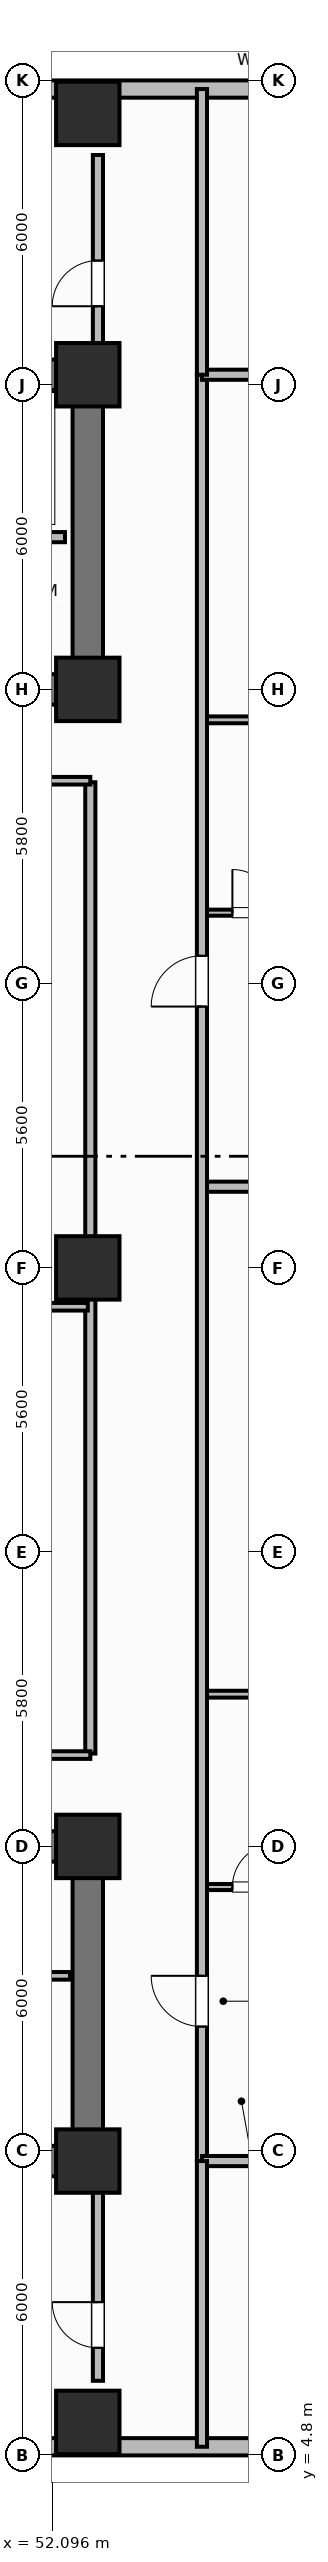
"""IFC4 building model, lengths in metres.
Left out: names, types, materials, properties, quantities, classifications, styles, units other than length and angle.
Written with IfcOpenShell. Run it as: python <this file> out.ifc"""

import sys

from ifc_helpers import new_model, si_unit, direction, frame, frame_2d, origin, origin_2d, place, context, subcontext, project, spatial, rectangle, extrude, element, fill, save


model = new_model("IFC4")
c1 = context("Model", 3, precision=1e-05, world=origin(), true_north=direction((0.0, 1.0)))
c2 = subcontext(c1, "Body", "Model", "MODEL_VIEW")
j1 = project(units=[si_unit("LENGTHUNIT", "METRE"), si_unit("PLANEANGLEUNIT", "RADIAN")], contexts=[c1])
p1 = place(None, origin())
s1 = spatial("IfcSite", under=j1, at=p1, CompositionType="ELEMENT")
p2 = place(p1, origin())
s2 = spatial("IfcBuilding", under=s1, at=p2, CompositionType="ELEMENT")
p3 = place(p2, frame((0.0, 0.0, 54.7)))
s3 = spatial("IfcBuildingStorey", under=s2, at=p3, CompositionType="ELEMENT", Elevation=54.7)
p4 = place(p3, frame((52.8, 10.6, 0.0), z_axis=(0.0, 0.0, 1.0), x_axis=(-1.0, 0.0, 0.0)))
e1 = element("IfcWall", 1, at=p4, inside=s3, PredefinedType="SHEAR", context=c2, shape_type="SweptSolid", body=[
    extrude(rectangle(XDim=27.2, YDim=0.6, at=frame_2d((13.6, 0.0))), origin(), (0.0, 0.0, 1.0), 3.7),
])
p5 = place(p3, frame((52.8, 10.9, 0.0), z_axis=(0.0, 0.0, 1.0), x_axis=(0.0, 1.0, 0.0)))
e2 = element("IfcWall", 2, at=p5, inside=s3, PredefinedType="SHEAR", context=c2, shape_type="SweptSolid", body=[
    extrude(rectangle(XDim=5.6, YDim=0.6, at=frame_2d((2.8, 0.0))), origin(), (0.0, 0.0, 1.0), 3.7),
])
p6 = place(p3, frame((25.6, 16.8, 0.0), z_axis=(0.0, 0.0, 1.0), x_axis=(1.0, 0.0, 0.0)))
e3 = element("IfcWall", 3, at=p6, inside=s3, PredefinedType="SHEAR", context=c2, shape_type="SweptSolid", body=[
    extrude(rectangle(XDim=27.2, YDim=0.6, at=frame_2d((13.6, 0.0))), origin(), (0.0, 0.0, 1.0), 3.7),
])
p7 = place(p6, frame((1.8, 0.0, 0.0)))
e4 = element("IfcOpeningElement", 4, at=p7, cuts=e3, PredefinedType="OPENING", context=c2, shape_type="SweptSolid", body=[
    extrude(rectangle(XDim=1.1, YDim=2.15, at=frame_2d((0.55, 1.075))), frame((0.0, 0.31, 0.0), z_axis=(0.0, -1.0, 0.0), x_axis=(1.0, 0.0, 0.0)), (0.0, 0.0, 1.0), 0.62),
])
p8 = place(p6, frame((5.6, 0.0, 0.0)))
e5 = element("IfcOpeningElement", 5, at=p8, cuts=e3, PredefinedType="OPENING", context=c2, shape_type="SweptSolid", body=[
    extrude(rectangle(XDim=0.85, YDim=2.1, at=frame_2d((0.425, 1.05))), frame((0.0, 0.31, 0.0), z_axis=(0.0, -1.0, 0.0), x_axis=(1.0, 0.0, 0.0)), (0.0, 0.0, 1.0), 0.62),
])
p9 = place(p6, frame((13.0, 0.0, 0.0)))
e6 = element("IfcOpeningElement", 6, at=p9, cuts=e3, PredefinedType="OPENING", context=c2, shape_type="SweptSolid", body=[
    extrude(rectangle(XDim=1.2, YDim=2.15, at=frame_2d((0.6, 1.075))), frame((0.0, 0.31, 0.0), z_axis=(0.0, -1.0, 0.0), x_axis=(1.0, 0.0, 0.0)), (0.0, 0.0, 1.0), 0.62),
])
p10 = place(p6, frame((20.4, 0.0, 0.0)))
e7 = element("IfcOpeningElement", 7, at=p10, cuts=e3, PredefinedType="OPENING", context=c2, shape_type="SweptSolid", body=[
    extrude(rectangle(XDim=1.3, YDim=2.2, at=frame_2d((0.65, 1.1))), frame((0.0, 0.31, 0.0), z_axis=(0.0, -1.0, 0.0), x_axis=(1.0, 0.0, 0.0)), (0.0, 0.0, 1.0), 0.62),
])
p11 = place(p6, frame((24.65, 0.0, 0.0)))
e8 = element("IfcOpeningElement", 8, at=p11, cuts=e3, PredefinedType="OPENING", context=c2, shape_type="SweptSolid", body=[
    extrude(rectangle(XDim=0.85, YDim=2.1, at=frame_2d((0.425, 1.05))), frame((0.0, 0.31, 0.0), z_axis=(0.0, -1.0, 0.0), x_axis=(1.0, 0.0, 0.0)), (0.0, 0.0, 1.0), 0.62),
])
p12 = place(p3, frame((25.6, 45.8, 0.0), z_axis=(0.0, 0.0, 1.0), x_axis=(1.0, 0.0, 0.0)))
e9 = element("IfcWall", 9, at=p12, inside=s3, PredefinedType="SHEAR", context=c2, shape_type="SweptSolid", body=[
    extrude(rectangle(XDim=27.2, YDim=0.6, at=frame_2d((13.6, 0.0))), origin(), (0.0, 0.0, 1.0), 3.7),
])
p13 = place(p3, frame((52.8, 39.9, 0.0), z_axis=(0.0, 0.0, 1.0), x_axis=(0.0, 1.0, 0.0)))
e10 = element("IfcWall", 10, at=p13, inside=s3, PredefinedType="SHEAR", context=c2, shape_type="SweptSolid", body=[
    extrude(rectangle(XDim=5.6, YDim=0.6, at=frame_2d((2.8, 0.0))), origin(), (0.0, 0.0, 1.0), 3.7),
])
p14 = place(p3, frame((52.8, 39.6, 0.0), z_axis=(0.0, 0.0, 1.0), x_axis=(-1.0, 0.0, 0.0)))
e11 = element("IfcWall", 11, at=p14, inside=s3, PredefinedType="SHEAR", context=c2, shape_type="SweptSolid", body=[
    extrude(rectangle(XDim=27.2, YDim=0.6, at=frame_2d((13.6, 0.0))), origin(), (0.0, 0.0, 1.0), 3.7),
])
p15 = place(p14, frame((24.2, 0.0, 0.0)))
e12 = element("IfcOpeningElement", 12, at=p15, cuts=e11, PredefinedType="OPENING", context=c2, shape_type="SweptSolid", body=[
    extrude(rectangle(XDim=1.1, YDim=2.15, at=frame_2d((0.55, 1.075))), frame((0.0, 0.31, 0.0), z_axis=(0.0, -1.0, 0.0), x_axis=(1.0, 0.0, 0.0)), (0.0, 0.0, 1.0), 0.62),
])
p16 = place(p14, frame((20.55, 0.0, 0.0)))
e13 = element("IfcOpeningElement", 13, at=p16, cuts=e11, PredefinedType="OPENING", context=c2, shape_type="SweptSolid", body=[
    extrude(rectangle(XDim=0.95, YDim=2.1, at=frame_2d((0.475, 1.05))), frame((0.0, 0.31, 0.0), z_axis=(0.0, -1.0, 0.0), x_axis=(1.0, 0.0, 0.0)), (0.0, 0.0, 1.0), 0.62),
])
p17 = place(p14, frame((15.1, 0.0, 0.0)))
e14 = element("IfcOpeningElement", 14, at=p17, cuts=e11, PredefinedType="OPENING", context=c2, shape_type="SweptSolid", body=[
    extrude(rectangle(XDim=1.2, YDim=2.15, at=frame_2d((0.6, 1.075))), frame((0.0, 0.31, 0.0), z_axis=(0.0, -1.0, 0.0), x_axis=(1.0, 0.0, 0.0)), (0.0, 0.0, 1.0), 0.62),
])
p18 = place(p14, frame((11.6, 0.0, 0.0)))
e15 = element("IfcOpeningElement", 15, at=p18, cuts=e11, PredefinedType="OPENING", context=c2, shape_type="SweptSolid", body=[
    extrude(rectangle(XDim=0.9, YDim=2.1, at=frame_2d((0.45, 1.05))), frame((0.0, 0.31, 0.0), z_axis=(0.0, -1.0, 0.0), x_axis=(1.0, 0.0, 0.0)), (0.0, 0.0, 1.0), 0.62),
])
p19 = place(p14, frame((4.8, 0.0, 0.0)))
e16 = element("IfcOpeningElement", 16, at=p19, cuts=e11, PredefinedType="OPENING", context=c2, shape_type="SweptSolid", body=[
    extrude(rectangle(XDim=0.85, YDim=2.1, at=frame_2d((0.425, 1.05))), frame((0.0, 0.31, 0.0), z_axis=(0.0, -1.0, 0.0), x_axis=(1.0, 0.0, 0.0)), (0.0, 0.0, 1.0), 0.62),
])
p20 = place(p14, frame((1.9, 0.0, 0.0)))
e17 = element("IfcOpeningElement", 17, at=p20, cuts=e11, PredefinedType="OPENING", context=c2, shape_type="SweptSolid", body=[
    extrude(rectangle(XDim=0.85, YDim=2.1, at=frame_2d((0.425, 1.05))), frame((0.0, 0.31, 0.0), z_axis=(0.0, -1.0, 0.0), x_axis=(1.0, 0.0, 0.0)), (0.0, 0.0, 1.0), 0.62),
])
for number, where, z_axis, x_axis in (
    (18, (52.8, 10.6, 0.0), (0.0, 0.0, 1.0), (1.0, 0.0, 0.0)),
    (19, (52.8, 16.8, 0.0), (0.0, 0.0, 1.0), (1.0, 0.0, 0.0)),
    (20, (52.8, 39.6, 0.0), (0.0, 0.0, 1.0), (1.0, 0.0, 0.0)),
    (21, (52.8, 45.8, 0.0), (0.0, 0.0, 1.0), (1.0, 0.0, 0.0)),
    (22, (52.8, 28.2, 0.0), (0.0, 0.0, 1.0), (1.0, 0.0, 0.0)),
    (23, (52.8, 5.45, 0.0), (0.0, 0.0, 1.0), (1.0, 0.0, 0.0)),
    (24, (52.8, 50.95, 0.0), (0.0, 0.0, 1.0), (1.0, 0.0, 0.0)),
):
    element("IfcColumn", number, at=place(p3, frame(where, z_axis=z_axis, x_axis=x_axis)), inside=s3, PredefinedType="COLUMN", context=c2, shape_type="SweptSolid", body=[
        extrude(rectangle(XDim=1.25, YDim=1.25, at=origin_2d()), origin(), (0.0, 0.0, 1.0), 3.7),
    ])
p21 = place(p3, frame((42.4, 4.97, 0.0), z_axis=(0.0, 0.0, 1.0), x_axis=(1.0, 0.0, 0.0)))
e25 = element("IfcWall", 25, at=p21, inside=s3, PredefinedType="SOLIDWALL", context=c2, shape_type="SweptSolid", body=[
    extrude(rectangle(XDim=17.4, YDim=0.34, at=frame_2d((8.7, 0.0))), origin(), (0.0, 0.0, 1.0), 2.7),
])
p22 = place(p21, frame((4.93, 0.0, 0.93)))
e26 = element("IfcOpeningElement", 26, at=p22, cuts=e25, PredefinedType="OPENING", context=c2, shape_type="SweptSolid", body=[
    extrude(rectangle(XDim=1.1, YDim=1.65, at=frame_2d((0.55, 0.825))), frame((0.0, 0.18, 0.0), z_axis=(0.0, -1.0, 0.0), x_axis=(1.0, 0.0, 0.0)), (0.0, 0.0, 1.0), 0.36),
])
p23 = place(p21, frame((7.8, 0.0, 0.93)))
e27 = element("IfcOpeningElement", 27, at=p23, cuts=e25, PredefinedType="OPENING", context=c2, shape_type="SweptSolid", body=[
    extrude(rectangle(XDim=1.1, YDim=1.65, at=frame_2d((0.55, 0.825))), frame((0.0, 0.18, 0.0), z_axis=(0.0, -1.0, 0.0), x_axis=(1.0, 0.0, 0.0)), (0.0, 0.0, 1.0), 0.36),
])
p24 = place(p21, frame((14.59, 0.0, 0.93)))
e28 = element("IfcOpeningElement", 28, at=p24, cuts=e25, PredefinedType="OPENING", context=c2, shape_type="SweptSolid", body=[
    extrude(rectangle(XDim=1.1, YDim=1.65, at=frame_2d((0.55, 0.825))), frame((0.0, 0.18, 0.0), z_axis=(0.0, -1.0, 0.0), x_axis=(1.0, 0.0, 0.0)), (0.0, 0.0, 1.0), 0.36),
])
p25 = place(p3, frame((59.8, 51.43, 0.0), z_axis=(0.0, 0.0, 1.0), x_axis=(-1.0, 0.0, 0.0)))
e29 = element("IfcWall", 29, at=p25, inside=s3, PredefinedType="SOLIDWALL", context=c2, shape_type="SweptSolid", body=[
    extrude(rectangle(XDim=17.4, YDim=0.34, at=frame_2d((8.7, 0.0))), origin(), (0.0, 0.0, 1.0), 2.7),
])
p26 = place(p25, frame((1.863, 0.0, 0.68)))
e30 = element("IfcOpeningElement", 30, at=p26, cuts=e29, PredefinedType="OPENING", context=c2, shape_type="SweptSolid", body=[
    extrude(rectangle(XDim=1.6, YDim=1.9, at=frame_2d((0.8, 0.95))), frame((0.0, 0.18, 0.0), z_axis=(0.0, -1.0, 0.0), x_axis=(1.0, 0.0, 0.0)), (0.0, 0.0, 1.0), 0.36),
])
p27 = place(p25, frame((9.913, 0.0, 0.68)))
e31 = element("IfcOpeningElement", 31, at=p27, cuts=e29, PredefinedType="OPENING", context=c2, shape_type="SweptSolid", body=[
    extrude(rectangle(XDim=1.6, YDim=1.9, at=frame_2d((0.8, 0.95))), frame((0.0, 0.18, 0.0), z_axis=(0.0, -1.0, 0.0), x_axis=(1.0, 0.0, 0.0)), (0.0, 0.0, 1.0), 0.36),
])
p28 = place(p3, frame((49.6, 14.25, 0.0), z_axis=(0.0, 0.0, 1.0), x_axis=(1.0, 0.0, 0.0)))
e32 = element("IfcWall", 32, at=p28, inside=s3, PredefinedType="PARTITIONING", context=c2, shape_type="SweptSolid", body=[
    extrude(rectangle(XDim=2.85, YDim=0.15, at=frame_2d((1.425, 0.0))), origin(), (0.0, 0.0, 1.0), 2.53),
])
p29 = place(p28, frame((0.9, 0.0, 0.0)))
e33 = element("IfcOpeningElement", 33, at=p29, cuts=e32, PredefinedType="OPENING", context=c2, shape_type="SweptSolid", body=[
    extrude(rectangle(XDim=0.85, YDim=2.1, at=frame_2d((0.425, 1.05))), frame((0.0, 0.085, 0.0), z_axis=(0.0, -1.0, 0.0), x_axis=(1.0, 0.0, 0.0)), (0.0, 0.0, 1.0), 0.17),
])
p30 = place(p3, frame((52.35, 42.6, 0.0), z_axis=(0.0, 0.0, 1.0), x_axis=(-1.0, 0.0, 0.0)))
e34 = element("IfcWall", 34, at=p30, inside=s3, PredefinedType="PARTITIONING", context=c2, shape_type="SweptSolid", body=[
    extrude(rectangle(XDim=8.8, YDim=0.2, at=frame_2d((4.4, 0.0))), origin(), (0.0, 0.0, 1.0), 2.53),
])
p31 = place(p3, frame((52.85, 18.63, 0.0), z_axis=(0.0, 0.0, 1.0), x_axis=(0.0, 1.0, 0.0)))
e35 = element("IfcWall", 35, at=p31, inside=s3, PredefinedType="PARTITIONING", context=c2, shape_type="SweptSolid", body=[
    extrude(rectangle(XDim=19.14, YDim=0.2, at=frame_2d((9.57, 0.0))), origin(), (0.0, 0.0, 1.0), 2.53),
])
for number, where, z_axis, x_axis in (
    (36, (40.35, 18.6, 0.0), (0.0, 0.0, 1.0), (1.0, 0.0, 0.0)),
    (37, (40.35, 37.8, 0.0), (0.0, 0.0, 1.0), (1.0, 0.0, 0.0)),
):
    element("IfcWall", number, at=place(p3, frame(where, z_axis=z_axis, x_axis=x_axis)), inside=s3, PredefinedType="PARTITIONING", context=c2, shape_type="SweptSolid", body=[
        extrude(rectangle(XDim=12.5, YDim=0.15, at=frame_2d((6.25, 0.0))), origin(), (0.0, 0.0, 1.0), 2.53),
    ])
p32 = place(p3, frame((40.38, 27.434, 0.0), z_axis=(0.0, 0.0, 1.0), x_axis=(1.0, 0.0, 0.0)))
e38 = element("IfcWall", 38, at=p32, inside=s3, PredefinedType="PARTITIONING", context=c2, shape_type="SweptSolid", body=[
    extrude(rectangle(XDim=12.42, YDim=0.15, at=frame_2d((6.21, 0.0))), origin(), (0.0, 0.0, 1.0), 2.53),
])
p33 = place(p3, frame((55.05, 16.0, 0.0), z_axis=(0.0, 0.0, 1.0), x_axis=(1.0, 0.0, 0.0)))
e39 = element("IfcWall", 39, at=p33, inside=s3, PredefinedType="PARTITIONING", context=c2, shape_type="SweptSolid", body=[
    extrude(rectangle(XDim=2.25, YDim=0.12, at=frame_2d((1.125, 0.0))), origin(), (0.0, 0.0, 1.0), 2.53),
])
p34 = place(p33, frame((0.6, 0.0, 0.0)))
e40 = element("IfcOpeningElement", 40, at=p34, cuts=e39, PredefinedType="OPENING", context=c2, shape_type="SweptSolid", body=[
    extrude(rectangle(XDim=0.85, YDim=2.1, at=frame_2d((0.425, 1.05))), frame((0.0, 0.07, 0.0), z_axis=(0.0, -1.0, 0.0), x_axis=(1.0, 0.0, 0.0)), (0.0, 0.0, 1.0), 0.14),
])
p35 = place(p3, frame((55.05, 19.8, 0.0), z_axis=(0.0, 0.0, 1.0), x_axis=(1.0, 0.0, 0.0)))
e41 = element("IfcWall", 41, at=p35, inside=s3, PredefinedType="PARTITIONING", context=c2, shape_type="SweptSolid", body=[
    extrude(rectangle(XDim=2.25, YDim=0.135, at=frame_2d((1.125, 0.0))), origin(), (0.0, 0.0, 1.0), 2.53),
])
p36 = place(p3, frame((55.05, 29.8, 0.0), z_axis=(0.0, 0.0, 1.0), x_axis=(1.0, 0.0, 0.0)))
e42 = element("IfcWall", 42, at=p36, inside=s3, PredefinedType="PARTITIONING", context=c2, shape_type="SweptSolid", body=[
    extrude(rectangle(XDim=8.066, YDim=0.2, at=frame_2d((4.033, 0.0))), origin(), (0.0, 0.0, 1.0), 2.53),
])
p37 = place(p3, frame((55.05, 35.2, 0.0), z_axis=(0.0, 0.0, 1.0), x_axis=(1.0, 0.0, 0.0)))
e43 = element("IfcWall", 43, at=p37, inside=s3, PredefinedType="PARTITIONING", context=c2, shape_type="SweptSolid", body=[
    extrude(rectangle(XDim=2.25, YDim=0.12, at=frame_2d((1.125, 0.0))), origin(), (0.0, 0.0, 1.0), 2.53),
])
p38 = place(p37, frame((0.6, 0.0, 0.0)))
e44 = element("IfcOpeningElement", 44, at=p38, cuts=e43, PredefinedType="OPENING", context=c2, shape_type="SweptSolid", body=[
    extrude(rectangle(XDim=0.85, YDim=2.1, at=frame_2d((0.425, 1.05))), frame((0.0, 0.07, 0.0), z_axis=(0.0, -1.0, 0.0), x_axis=(1.0, 0.0, 0.0)), (0.0, 0.0, 1.0), 0.14),
])
p39 = place(p3, frame((55.05, 39.0, 0.0), z_axis=(0.0, 0.0, 1.0), x_axis=(1.0, 0.0, 0.0)))
e45 = element("IfcWall", 45, at=p39, inside=s3, PredefinedType="PARTITIONING", context=c2, shape_type="SweptSolid", body=[
    extrude(rectangle(XDim=2.25, YDim=0.135, at=frame_2d((1.125, 0.0))), origin(), (0.0, 0.0, 1.0), 2.53),
])
p40 = place(p3, frame((55.05, 10.6, 0.0), z_axis=(0.0, 0.0, 1.0), x_axis=(0.0, 1.0, 0.0)))
e46 = element("IfcWall", 46, at=p40, inside=s3, PredefinedType="PARTITIONING", context=c2, shape_type="SweptSolid", body=[
    extrude(rectangle(XDim=35.2, YDim=0.2, at=frame_2d((17.6, 0.0))), origin(), (0.0, 0.0, 1.0), 2.53),
])
p41 = place(p40, frame((2.65, 0.0, 0.0)))
e47 = element("IfcOpeningElement", 47, at=p41, cuts=e46, PredefinedType="OPENING", context=c2, shape_type="SweptSolid", body=[
    extrude(rectangle(XDim=1.0, YDim=2.15, at=frame_2d((0.5, 1.075))), frame((0.0, 0.11, 0.0), z_axis=(0.0, -1.0, 0.0), x_axis=(1.0, 0.0, 0.0)), (0.0, 0.0, 1.0), 0.22),
])
p42 = place(p40, frame((22.75, 0.0, 0.0)))
e48 = element("IfcOpeningElement", 48, at=p42, cuts=e46, PredefinedType="OPENING", context=c2, shape_type="SweptSolid", body=[
    extrude(rectangle(XDim=1.0, YDim=2.15, at=frame_2d((0.5, 1.075))), frame((0.0, 0.11, 0.0), z_axis=(0.0, -1.0, 0.0), x_axis=(1.0, 0.0, 0.0)), (0.0, 0.0, 1.0), 0.22),
])
for number, where, z_axis, x_axis in (
    (49, (55.05, 10.6, 0.0), (0.0, 0.0, 1.0), (1.0, 0.0, 0.0)),
    (50, (55.05, 45.8, 0.0), (0.0, 0.0, 1.0), (1.0, 0.0, 0.0)),
):
    element("IfcWall", number, at=place(p3, frame(where, z_axis=z_axis, x_axis=x_axis)), inside=s3, PredefinedType="PARTITIONING", context=c2, shape_type="SweptSolid", body=[
        extrude(rectangle(XDim=8.36, YDim=0.2, at=frame_2d((4.18, 0.0))), origin(), (0.0, 0.0, 1.0), 2.53),
    ])
p43 = place(p3, frame((55.05, 4.97, 0.0), z_axis=(0.0, 0.0, 1.0), x_axis=(0.0, 1.0, 0.0)))
e51 = element("IfcWall", 51, at=p43, inside=s3, PredefinedType="PARTITIONING", context=c2, shape_type="SweptSolid", body=[
    extrude(rectangle(XDim=5.63, YDim=0.2, at=frame_2d((2.815, 0.0))), origin(), (0.0, 0.0, 1.0), 2.53),
])
p44 = place(p3, frame((55.05, 45.8, 0.0), z_axis=(0.0, 0.0, 1.0), x_axis=(0.0, 1.0, 0.0)))
e52 = element("IfcWall", 52, at=p44, inside=s3, PredefinedType="PARTITIONING", context=c2, shape_type="SweptSolid", body=[
    extrude(rectangle(XDim=5.63, YDim=0.2, at=frame_2d((2.815, 0.0))), origin(), (0.0, 0.0, 1.0), 2.53),
])
p45 = place(p3, frame((53.0, 6.27, 0.0), z_axis=(0.0, 0.0, 1.0), x_axis=(0.0, 1.0, 0.0)))
e53 = element("IfcWall", 53, at=p45, inside=s3, PredefinedType="PARTITIONING", context=c2, shape_type="SweptSolid", body=[
    extrude(rectangle(XDim=4.03, YDim=0.2, at=frame_2d((2.015, 0.0))), origin(), (0.0, 0.0, 1.0), 2.53),
])
p46 = place(p45, frame((0.65, 0.0, 0.0)))
e54 = element("IfcOpeningElement", 54, at=p46, cuts=e53, PredefinedType="OPENING", context=c2, shape_type="SweptSolid", body=[
    extrude(rectangle(XDim=0.9, YDim=2.1, at=frame_2d((0.45, 1.05))), frame((0.0, 0.11, 0.0), z_axis=(0.0, -1.0, 0.0), x_axis=(1.0, 0.0, 0.0)), (0.0, 0.0, 1.0), 0.22),
])
p47 = place(p3, frame((53.0, 46.1, 0.0), z_axis=(0.0, 0.0, 1.0), x_axis=(0.0, 1.0, 0.0)))
e55 = element("IfcWall", 55, at=p47, inside=s3, PredefinedType="PARTITIONING", context=c2, shape_type="SweptSolid", body=[
    extrude(rectangle(XDim=4.03, YDim=0.2, at=frame_2d((2.015, 0.0))), origin(), (0.0, 0.0, 1.0), 2.53),
])
p48 = place(p47, frame((1.05, 0.0, 0.0)))
e56 = element("IfcOpeningElement", 56, at=p48, cuts=e55, PredefinedType="OPENING", context=c2, shape_type="SweptSolid", body=[
    extrude(rectangle(XDim=0.9, YDim=2.1, at=frame_2d((0.45, 1.05))), frame((0.0, 0.11, 0.0), z_axis=(0.0, -1.0, 0.0), x_axis=(1.0, 0.0, 0.0)), (0.0, 0.0, 1.0), 0.22),
])
p49 = place(p34, origin())
e57 = element("IfcDoor", 57, at=p49, inside=s3, OperationType="SINGLE_SWING_RIGHT", PredefinedType="DOOR", context=c2, shape_type="SweptSolid", body=[
    extrude(rectangle(XDim=0.85, YDim=2.1, at=frame_2d((0.425, 1.05))), frame((0.0, 0.025, 0.0), z_axis=(0.0, -1.0, 0.0), x_axis=(1.0, 0.0, 0.0)), (0.0, 0.0, 1.0), 0.05),
])
fill(e40, e57)
p50 = place(p38, origin())
e58 = element("IfcDoor", 58, at=p50, inside=s3, OperationType="SINGLE_SWING_LEFT", PredefinedType="DOOR", context=c2, shape_type="SweptSolid", body=[
    extrude(rectangle(XDim=0.85, YDim=2.1, at=frame_2d((0.425, 1.05))), frame((0.0, 0.025, 0.0), z_axis=(0.0, -1.0, 0.0), x_axis=(1.0, 0.0, 0.0)), (0.0, 0.0, 1.0), 0.05),
])
fill(e44, e58)
p51 = place(p41, origin())
e59 = element("IfcDoor", 59, at=p51, inside=s3, OperationType="SINGLE_SWING_RIGHT", PredefinedType="DOOR", context=c2, shape_type="SweptSolid", body=[
    extrude(rectangle(XDim=1.0, YDim=2.15, at=frame_2d((0.5, 1.075))), frame((0.0, 0.025, 0.0), z_axis=(0.0, -1.0, 0.0), x_axis=(1.0, 0.0, 0.0)), (0.0, 0.0, 1.0), 0.05),
])
fill(e47, e59)
p52 = place(p42, origin())
e60 = element("IfcDoor", 60, at=p52, inside=s3, OperationType="SINGLE_SWING_LEFT", PredefinedType="DOOR", context=c2, shape_type="SweptSolid", body=[
    extrude(rectangle(XDim=1.0, YDim=2.15, at=frame_2d((0.5, 1.075))), frame((0.0, 0.025, 0.0), z_axis=(0.0, -1.0, 0.0), x_axis=(1.0, 0.0, 0.0)), (0.0, 0.0, 1.0), 0.05),
])
fill(e48, e60)
p53 = place(p46, origin())
e61 = element("IfcDoor", 61, at=p53, inside=s3, OperationType="SINGLE_SWING_RIGHT", PredefinedType="DOOR", context=c2, shape_type="SweptSolid", body=[
    extrude(rectangle(XDim=0.9, YDim=2.1, at=frame_2d((0.45, 1.05))), frame((0.0, 0.025, 0.0), z_axis=(0.0, -1.0, 0.0), x_axis=(1.0, 0.0, 0.0)), (0.0, 0.0, 1.0), 0.05),
])
fill(e54, e61)
p54 = place(p48, origin())
e62 = element("IfcDoor", 62, at=p54, inside=s3, OperationType="SINGLE_SWING_LEFT", PredefinedType="DOOR", context=c2, shape_type="SweptSolid", body=[
    extrude(rectangle(XDim=0.9, YDim=2.1, at=frame_2d((0.45, 1.05))), frame((0.0, 0.025, 0.0), z_axis=(0.0, -1.0, 0.0), x_axis=(1.0, 0.0, 0.0)), (0.0, 0.0, 1.0), 0.05),
])
fill(e56, e62)
save(model, sys.argv[1])
